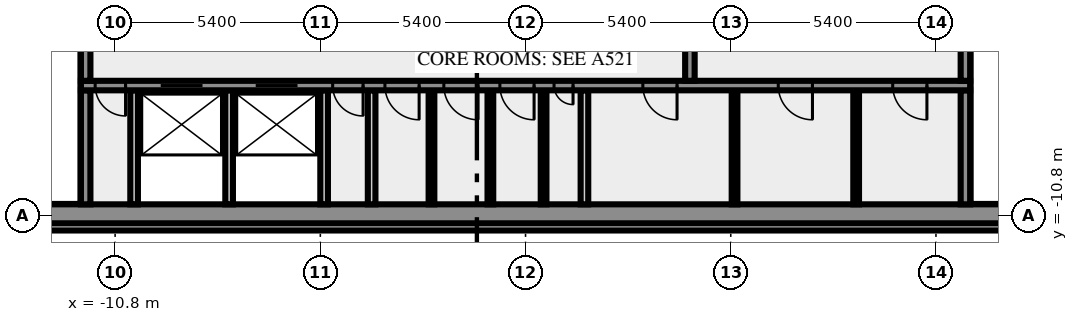
"""IFC4 building model, lengths in metres.
Left out: names, types, materials, properties, quantities, classifications, styles, units other than length and angle.
Written with IfcOpenShell. Run it as: python <this file> out.ifc"""

import sys

from ifc_helpers import new_model, si_unit, direction, frame, frame_2d, origin, place, context, subcontext, project, spatial, rectangle, extrude, element, fill, save


model = new_model("IFC4")
c1 = context("Model", 3, precision=1e-05, world=origin(), true_north=direction((0.0, 1.0)))
c2 = subcontext(c1, "Body", "Model", "MODEL_VIEW")
j1 = project(units=[si_unit("LENGTHUNIT", "METRE"), si_unit("PLANEANGLEUNIT", "RADIAN")], contexts=[c1])
p1 = place(None, origin())
s1 = spatial("IfcSite", under=j1, at=p1, CompositionType="ELEMENT")
p2 = place(p1, origin())
s2 = spatial("IfcBuilding", under=s1, at=p2, CompositionType="ELEMENT")
p3 = place(p2, frame((0.0, 0.0, 323.0)))
s3 = spatial("IfcBuildingStorey", under=s2, at=p3, CompositionType="ELEMENT", Elevation=323.0)
p4 = place(p3, frame((-17.444, -11.088, 0.0), z_axis=(0.0, 0.0, 1.0), x_axis=(1.0, 0.0, 0.0)))
e1 = element("IfcWall", 1, at=p4, inside=s3, PredefinedType="SOLIDWALL", context=c2, shape_type="SweptSolid", body=[
    extrude(rectangle(XDim=34.888, YDim=0.2, at=frame_2d((17.444, 0.0))), origin(), (0.0, 0.0, 1.0), 3.65),
])
p5 = place(p3, frame((-20.0, -10.75, 0.0), z_axis=(0.0, 0.0, 1.0), x_axis=(1.0, 0.0, 0.0)))
e2 = element("IfcWall", 2, at=p5, inside=s3, PredefinedType="SHEAR", context=c2, shape_type="SweptSolid", body=[
    extrude(rectangle(XDim=40.0, YDim=0.5, at=frame_2d((20.0, 0.0))), origin(), (0.0, 0.0, 1.0), 3.65),
])
p6 = place(p5, frame((0.8, 0.0, 1.0)))
e3 = element("IfcOpeningElement", 3, at=p6, cuts=e2, PredefinedType="OPENING", context=c2, shape_type="SweptSolid", body=[
    extrude(rectangle(XDim=1.2, YDim=1.2, at=frame_2d((0.6, 0.6))), frame((0.0, 0.26, 0.0), z_axis=(0.0, -1.0, 0.0), x_axis=(1.0, 0.0, 0.0)), (0.0, 0.0, 1.0), 0.52),
])
p7 = place(p5, frame((38.0, 0.0, 1.0)))
e4 = element("IfcOpeningElement", 4, at=p7, cuts=e2, PredefinedType="OPENING", context=c2, shape_type="SweptSolid", body=[
    extrude(rectangle(XDim=1.2, YDim=1.2, at=frame_2d((0.6, 0.6))), frame((0.0, 0.26, 0.0), z_axis=(0.0, -1.0, 0.0), x_axis=(1.0, 0.0, 0.0)), (0.0, 0.0, 1.0), 0.52),
])
p8 = place(p3, frame((-11.575, -10.5, 0.0), z_axis=(0.0, 0.0, 1.0), x_axis=(0.0, 1.0, 0.0)))
e5 = element("IfcWall", 5, at=p8, inside=s3, PredefinedType="SHEAR", context=c2, shape_type="SweptSolid", body=[
    extrude(rectangle(XDim=3.0, YDim=0.25, at=frame_2d((1.5, 0.0))), origin(), (0.0, 0.0, 1.0), 3.65),
])
for number, where, z_axis, x_axis in (
    (6, (-10.3, -10.5, 0.0), (0.0, 0.0, 1.0), (0.0, 1.0, 0.0)),
    (7, (-7.8, -10.5, 0.0), (0.0, 0.0, 1.0), (0.0, 1.0, 0.0)),
    (8, (-5.3, -10.5, 0.0), (0.0, 0.0, 1.0), (0.0, 1.0, 0.0)),
    (9, (-4.05, -10.5, 0.0), (0.0, 0.0, 1.0), (0.0, 1.0, 0.0)),
):
    element("IfcWall", number, at=place(p3, frame(where, z_axis=z_axis, x_axis=x_axis)), inside=s3, PredefinedType="SOLIDWALL", context=c2, shape_type="SweptSolid", body=[
        extrude(rectangle(XDim=3.0, YDim=0.2, at=frame_2d((1.5, 0.0))), origin(), (0.0, 0.0, 1.0), 3.65),
    ])
for number, where, z_axis, x_axis in (
    (10, (-2.475, -10.5, 0.0), (0.0, 0.0, 1.0), (0.0, 1.0, 0.0)),
    (11, (-0.925, -10.5, 0.0), (0.0, 0.0, 1.0), (0.0, 1.0, 0.0)),
    (12, (0.475, -10.5, 0.0), (0.0, 0.0, 1.0), (0.0, 1.0, 0.0)),
):
    element("IfcWall", number, at=place(p3, frame(where, z_axis=z_axis, x_axis=x_axis)), inside=s3, PredefinedType="PARTITIONING", context=c2, shape_type="SweptSolid", body=[
        extrude(rectangle(XDim=3.0, YDim=0.15, at=frame_2d((1.5, 0.0))), origin(), (0.0, 0.0, 1.0), 3.65),
    ])
p9 = place(p3, frame((1.55, -10.5, 0.0), z_axis=(0.0, 0.0, 1.0), x_axis=(0.0, 1.0, 0.0)))
e13 = element("IfcWall", 13, at=p9, inside=s3, PredefinedType="SOLIDWALL", context=c2, shape_type="SweptSolid", body=[
    extrude(rectangle(XDim=3.0, YDim=0.2, at=frame_2d((1.5, 0.0))), origin(), (0.0, 0.0, 1.0), 3.65),
])
for number, where, z_axis, x_axis in (
    (14, (5.5, -10.5, 0.0), (0.0, 0.0, 1.0), (0.0, 1.0, 0.0)),
    (15, (8.7, -10.5, 0.0), (0.0, 0.0, 1.0), (0.0, 1.0, 0.0)),
):
    element("IfcWall", number, at=place(p3, frame(where, z_axis=z_axis, x_axis=x_axis)), inside=s3, PredefinedType="PARTITIONING", context=c2, shape_type="SweptSolid", body=[
        extrude(rectangle(XDim=3.0, YDim=0.15, at=frame_2d((1.5, 0.0))), origin(), (0.0, 0.0, 1.0), 3.65),
    ])
p10 = place(p3, frame((11.575, -10.5, 0.0), z_axis=(0.0, 0.0, 1.0), x_axis=(0.0, 1.0, 0.0)))
e16 = element("IfcWall", 16, at=p10, inside=s3, PredefinedType="SHEAR", context=c2, shape_type="SweptSolid", body=[
    extrude(rectangle(XDim=3.0, YDim=0.25, at=frame_2d((1.5, 0.0))), origin(), (0.0, 0.0, 1.0), 3.65),
])
p11 = place(p3, frame((11.7, -7.375, 0.0), z_axis=(0.0, 0.0, 1.0), x_axis=(-1.0, 0.0, 0.0)))
e17 = element("IfcWall", 17, at=p11, inside=s3, PredefinedType="SHEAR", context=c2, shape_type="SweptSolid", body=[
    extrude(rectangle(XDim=23.4, YDim=0.25, at=frame_2d((11.7, 0.0))), origin(), (0.0, 0.0, 1.0), 3.65),
])
p12 = place(p11, frame((22.225, 0.0, 0.0)))
e18 = element("IfcOpeningElement", 18, at=p12, cuts=e17, PredefinedType="OPENING", context=c2, shape_type="SweptSolid", body=[
    extrude(rectangle(XDim=0.8, YDim=2.1, at=frame_2d((0.4, 1.05))), frame((0.0, 0.135, 0.0), z_axis=(0.0, -1.0, 0.0), x_axis=(1.0, 0.0, 0.0)), (0.0, 0.0, 1.0), 0.27),
])
p13 = place(p11, frame((20.2, 0.0, 0.0)))
e19 = element("IfcOpeningElement", 19, at=p13, cuts=e17, PredefinedType="OPENING", context=c2, shape_type="SweptSolid", body=[
    extrude(rectangle(XDim=1.1, YDim=2.1, at=frame_2d((0.55, 1.05))), frame((0.0, 0.135, 0.0), z_axis=(0.0, -1.0, 0.0), x_axis=(1.0, 0.0, 0.0)), (0.0, 0.0, 1.0), 0.27),
])
p14 = place(p11, frame((17.7, 0.0, 0.0)))
e20 = element("IfcOpeningElement", 20, at=p14, cuts=e17, PredefinedType="OPENING", context=c2, shape_type="SweptSolid", body=[
    extrude(rectangle(XDim=1.1, YDim=2.1, at=frame_2d((0.55, 1.05))), frame((0.0, 0.135, 0.0), z_axis=(0.0, -1.0, 0.0), x_axis=(1.0, 0.0, 0.0)), (0.0, 0.0, 1.0), 0.27),
])
p15 = place(p11, frame((15.975, 0.0, 0.0)))
e21 = element("IfcOpeningElement", 21, at=p15, cuts=e17, PredefinedType="OPENING", context=c2, shape_type="SweptSolid", body=[
    extrude(rectangle(XDim=0.8, YDim=2.1, at=frame_2d((0.4, 1.05))), frame((0.0, 0.135, 0.0), z_axis=(0.0, -1.0, 0.0), x_axis=(1.0, 0.0, 0.0)), (0.0, 0.0, 1.0), 0.27),
])
p16 = place(p11, frame((14.5, 0.0, 0.0)))
e22 = element("IfcOpeningElement", 22, at=p16, cuts=e17, PredefinedType="OPENING", context=c2, shape_type="SweptSolid", body=[
    extrude(rectangle(XDim=0.9, YDim=2.1, at=frame_2d((0.45, 1.05))), frame((0.0, 0.135, 0.0), z_axis=(0.0, -1.0, 0.0), x_axis=(1.0, 0.0, 0.0)), (0.0, 0.0, 1.0), 0.27),
])
p17 = place(p11, frame((12.95, 0.0, 0.0)))
e23 = element("IfcOpeningElement", 23, at=p17, cuts=e17, PredefinedType="OPENING", context=c2, shape_type="SweptSolid", body=[
    extrude(rectangle(XDim=0.9, YDim=2.1, at=frame_2d((0.45, 1.05))), frame((0.0, 0.135, 0.0), z_axis=(0.0, -1.0, 0.0), x_axis=(1.0, 0.0, 0.0)), (0.0, 0.0, 1.0), 0.27),
])
p18 = place(p11, frame((11.475, 0.0, 0.0)))
e24 = element("IfcOpeningElement", 24, at=p18, cuts=e17, PredefinedType="OPENING", context=c2, shape_type="SweptSolid", body=[
    extrude(rectangle(XDim=0.9, YDim=2.1, at=frame_2d((0.45, 1.05))), frame((0.0, 0.135, 0.0), z_axis=(0.0, -1.0, 0.0), x_axis=(1.0, 0.0, 0.0)), (0.0, 0.0, 1.0), 0.27),
])
p19 = place(p11, frame((10.45, 0.0, 0.0)))
e25 = element("IfcOpeningElement", 25, at=p19, cuts=e17, PredefinedType="OPENING", context=c2, shape_type="SweptSolid", body=[
    extrude(rectangle(XDim=0.5, YDim=2.1, at=frame_2d((0.25, 1.05))), frame((0.0, 0.135, 0.0), z_axis=(0.0, -1.0, 0.0), x_axis=(1.0, 0.0, 0.0)), (0.0, 0.0, 1.0), 0.27),
])
p20 = place(p11, frame((7.713, 0.0, 0.0)))
e26 = element("IfcOpeningElement", 26, at=p20, cuts=e17, PredefinedType="OPENING", context=c2, shape_type="SweptSolid", body=[
    extrude(rectangle(XDim=0.9, YDim=2.1, at=frame_2d((0.45, 1.05))), frame((0.0, 0.135, 0.0), z_axis=(0.0, -1.0, 0.0), x_axis=(1.0, 0.0, 0.0)), (0.0, 0.0, 1.0), 0.27),
])
p21 = place(p11, frame((4.15, 0.0, 0.0)))
e27 = element("IfcOpeningElement", 27, at=p21, cuts=e17, PredefinedType="OPENING", context=c2, shape_type="SweptSolid", body=[
    extrude(rectangle(XDim=0.9, YDim=2.1, at=frame_2d((0.45, 1.05))), frame((0.0, 0.135, 0.0), z_axis=(0.0, -1.0, 0.0), x_axis=(1.0, 0.0, 0.0)), (0.0, 0.0, 1.0), 0.27),
])
p22 = place(p11, frame((1.138, 0.0, 0.0)))
e28 = element("IfcOpeningElement", 28, at=p22, cuts=e17, PredefinedType="OPENING", context=c2, shape_type="SweptSolid", body=[
    extrude(rectangle(XDim=0.9, YDim=2.1, at=frame_2d((0.45, 1.05))), frame((0.0, 0.135, 0.0), z_axis=(0.0, -1.0, 0.0), x_axis=(1.0, 0.0, 0.0)), (0.0, 0.0, 1.0), 0.27),
])
p23 = place(p3, frame((-11.575, -7.25, 0.0), z_axis=(0.0, 0.0, 1.0), x_axis=(0.0, 1.0, 0.0)))
e29 = element("IfcWall", 29, at=p23, inside=s3, PredefinedType="SHEAR", context=c2, shape_type="SweptSolid", body=[
    extrude(rectangle(XDim=1.0, YDim=0.25, at=frame_2d((0.5, 0.0))), origin(), (0.0, 0.0, 1.0), 3.65),
])
p24 = place(p3, frame((4.325, -7.25, 0.0), z_axis=(0.0, 0.0, 1.0), x_axis=(0.0, 1.0, 0.0)))
e30 = element("IfcWall", 30, at=p24, inside=s3, PredefinedType="SHEAR", context=c2, shape_type="SweptSolid", body=[
    extrude(rectangle(XDim=3.0, YDim=0.25, at=frame_2d((1.5, 0.0))), origin(), (0.0, 0.0, 1.0), 3.65),
])
p25 = place(p24, frame((0.8, 0.0, 0.0)))
e31 = element("IfcOpeningElement", 31, at=p25, cuts=e30, PredefinedType="OPENING", context=c2, shape_type="SweptSolid", body=[
    extrude(rectangle(XDim=1.4, YDim=2.1, at=frame_2d((0.7, 1.05))), frame((0.0, 0.135, 0.0), z_axis=(0.0, -1.0, 0.0), x_axis=(1.0, 0.0, 0.0)), (0.0, 0.0, 1.0), 0.27),
])
p26 = place(p3, frame((11.575, -7.25, 0.0), z_axis=(0.0, 0.0, 1.0), x_axis=(0.0, 1.0, 0.0)))
e32 = element("IfcWall", 32, at=p26, inside=s3, PredefinedType="SHEAR", context=c2, shape_type="SweptSolid", body=[
    extrude(rectangle(XDim=1.0, YDim=0.25, at=frame_2d((0.5, 0.0))), origin(), (0.0, 0.0, 1.0), 3.65),
])
p27 = place(p12, origin())
e33 = element("IfcDoor", 33, at=p27, inside=s3, OperationType="SINGLE_SWING_RIGHT", PredefinedType="DOOR", context=c2, shape_type="SweptSolid", body=[
    extrude(rectangle(XDim=0.8, YDim=2.1, at=frame_2d((0.4, 1.05))), frame((0.0, 0.025, 0.0), z_axis=(0.0, -1.0, 0.0), x_axis=(1.0, 0.0, 0.0)), (0.0, 0.0, 1.0), 0.05),
])
fill(e18, e33)
p28 = place(p13, origin())
e34 = element("IfcDoor", 34, at=p28, inside=s3, OperationType="DOUBLE_DOOR_SLIDING", PredefinedType="DOOR", context=c2, shape_type="SweptSolid", body=[
    extrude(rectangle(XDim=1.1, YDim=2.1, at=frame_2d((0.55, 1.05))), frame((0.0, 0.025, 0.0), z_axis=(0.0, -1.0, 0.0), x_axis=(1.0, 0.0, 0.0)), (0.0, 0.0, 1.0), 0.05),
])
fill(e19, e34)
p29 = place(p14, origin())
e35 = element("IfcDoor", 35, at=p29, inside=s3, OperationType="DOUBLE_DOOR_SLIDING", PredefinedType="DOOR", context=c2, shape_type="SweptSolid", body=[
    extrude(rectangle(XDim=1.1, YDim=2.1, at=frame_2d((0.55, 1.05))), frame((0.0, 0.025, 0.0), z_axis=(0.0, -1.0, 0.0), x_axis=(1.0, 0.0, 0.0)), (0.0, 0.0, 1.0), 0.05),
])
fill(e20, e35)
p30 = place(p15, origin())
e36 = element("IfcDoor", 36, at=p30, inside=s3, OperationType="SINGLE_SWING_RIGHT", PredefinedType="DOOR", context=c2, shape_type="SweptSolid", body=[
    extrude(rectangle(XDim=0.8, YDim=2.1, at=frame_2d((0.4, 1.05))), frame((0.0, 0.025, 0.0), z_axis=(0.0, -1.0, 0.0), x_axis=(1.0, 0.0, 0.0)), (0.0, 0.0, 1.0), 0.05),
])
fill(e21, e36)
p31 = place(p16, origin())
e37 = element("IfcDoor", 37, at=p31, inside=s3, OperationType="SINGLE_SWING_RIGHT", PredefinedType="DOOR", context=c2, shape_type="SweptSolid", body=[
    extrude(rectangle(XDim=0.9, YDim=2.1, at=frame_2d((0.45, 1.05))), frame((0.0, 0.025, 0.0), z_axis=(0.0, -1.0, 0.0), x_axis=(1.0, 0.0, 0.0)), (0.0, 0.0, 1.0), 0.05),
])
fill(e22, e37)
p32 = place(p17, origin())
e38 = element("IfcDoor", 38, at=p32, inside=s3, OperationType="SINGLE_SWING_RIGHT", PredefinedType="DOOR", context=c2, shape_type="SweptSolid", body=[
    extrude(rectangle(XDim=0.9, YDim=2.1, at=frame_2d((0.45, 1.05))), frame((0.0, 0.025, 0.0), z_axis=(0.0, -1.0, 0.0), x_axis=(1.0, 0.0, 0.0)), (0.0, 0.0, 1.0), 0.05),
])
fill(e23, e38)
p33 = place(p18, origin())
e39 = element("IfcDoor", 39, at=p33, inside=s3, OperationType="SINGLE_SWING_RIGHT", PredefinedType="DOOR", context=c2, shape_type="SweptSolid", body=[
    extrude(rectangle(XDim=0.9, YDim=2.1, at=frame_2d((0.45, 1.05))), frame((0.0, 0.025, 0.0), z_axis=(0.0, -1.0, 0.0), x_axis=(1.0, 0.0, 0.0)), (0.0, 0.0, 1.0), 0.05),
])
fill(e24, e39)
p34 = place(p19, origin())
e40 = element("IfcDoor", 40, at=p34, inside=s3, OperationType="SINGLE_SWING_LEFT", PredefinedType="DOOR", context=c2, shape_type="SweptSolid", body=[
    extrude(rectangle(XDim=0.5, YDim=2.1, at=frame_2d((0.25, 1.05))), frame((0.0, 0.025, 0.0), z_axis=(0.0, -1.0, 0.0), x_axis=(1.0, 0.0, 0.0)), (0.0, 0.0, 1.0), 0.05),
])
fill(e25, e40)
p35 = place(p20, origin())
e41 = element("IfcDoor", 41, at=p35, inside=s3, OperationType="SINGLE_SWING_LEFT", PredefinedType="DOOR", context=c2, shape_type="SweptSolid", body=[
    extrude(rectangle(XDim=0.9, YDim=2.1, at=frame_2d((0.45, 1.05))), frame((0.0, 0.025, 0.0), z_axis=(0.0, -1.0, 0.0), x_axis=(1.0, 0.0, 0.0)), (0.0, 0.0, 1.0), 0.05),
])
fill(e26, e41)
p36 = place(p21, origin())
e42 = element("IfcDoor", 42, at=p36, inside=s3, OperationType="SINGLE_SWING_LEFT", PredefinedType="DOOR", context=c2, shape_type="SweptSolid", body=[
    extrude(rectangle(XDim=0.9, YDim=2.1, at=frame_2d((0.45, 1.05))), frame((0.0, 0.025, 0.0), z_axis=(0.0, -1.0, 0.0), x_axis=(1.0, 0.0, 0.0)), (0.0, 0.0, 1.0), 0.05),
])
fill(e27, e42)
p37 = place(p22, origin())
e43 = element("IfcDoor", 43, at=p37, inside=s3, OperationType="SINGLE_SWING_LEFT", PredefinedType="DOOR", context=c2, shape_type="SweptSolid", body=[
    extrude(rectangle(XDim=0.9, YDim=2.1, at=frame_2d((0.45, 1.05))), frame((0.0, 0.025, 0.0), z_axis=(0.0, -1.0, 0.0), x_axis=(1.0, 0.0, 0.0)), (0.0, 0.0, 1.0), 0.05),
])
fill(e28, e43)
save(model, sys.argv[1])
